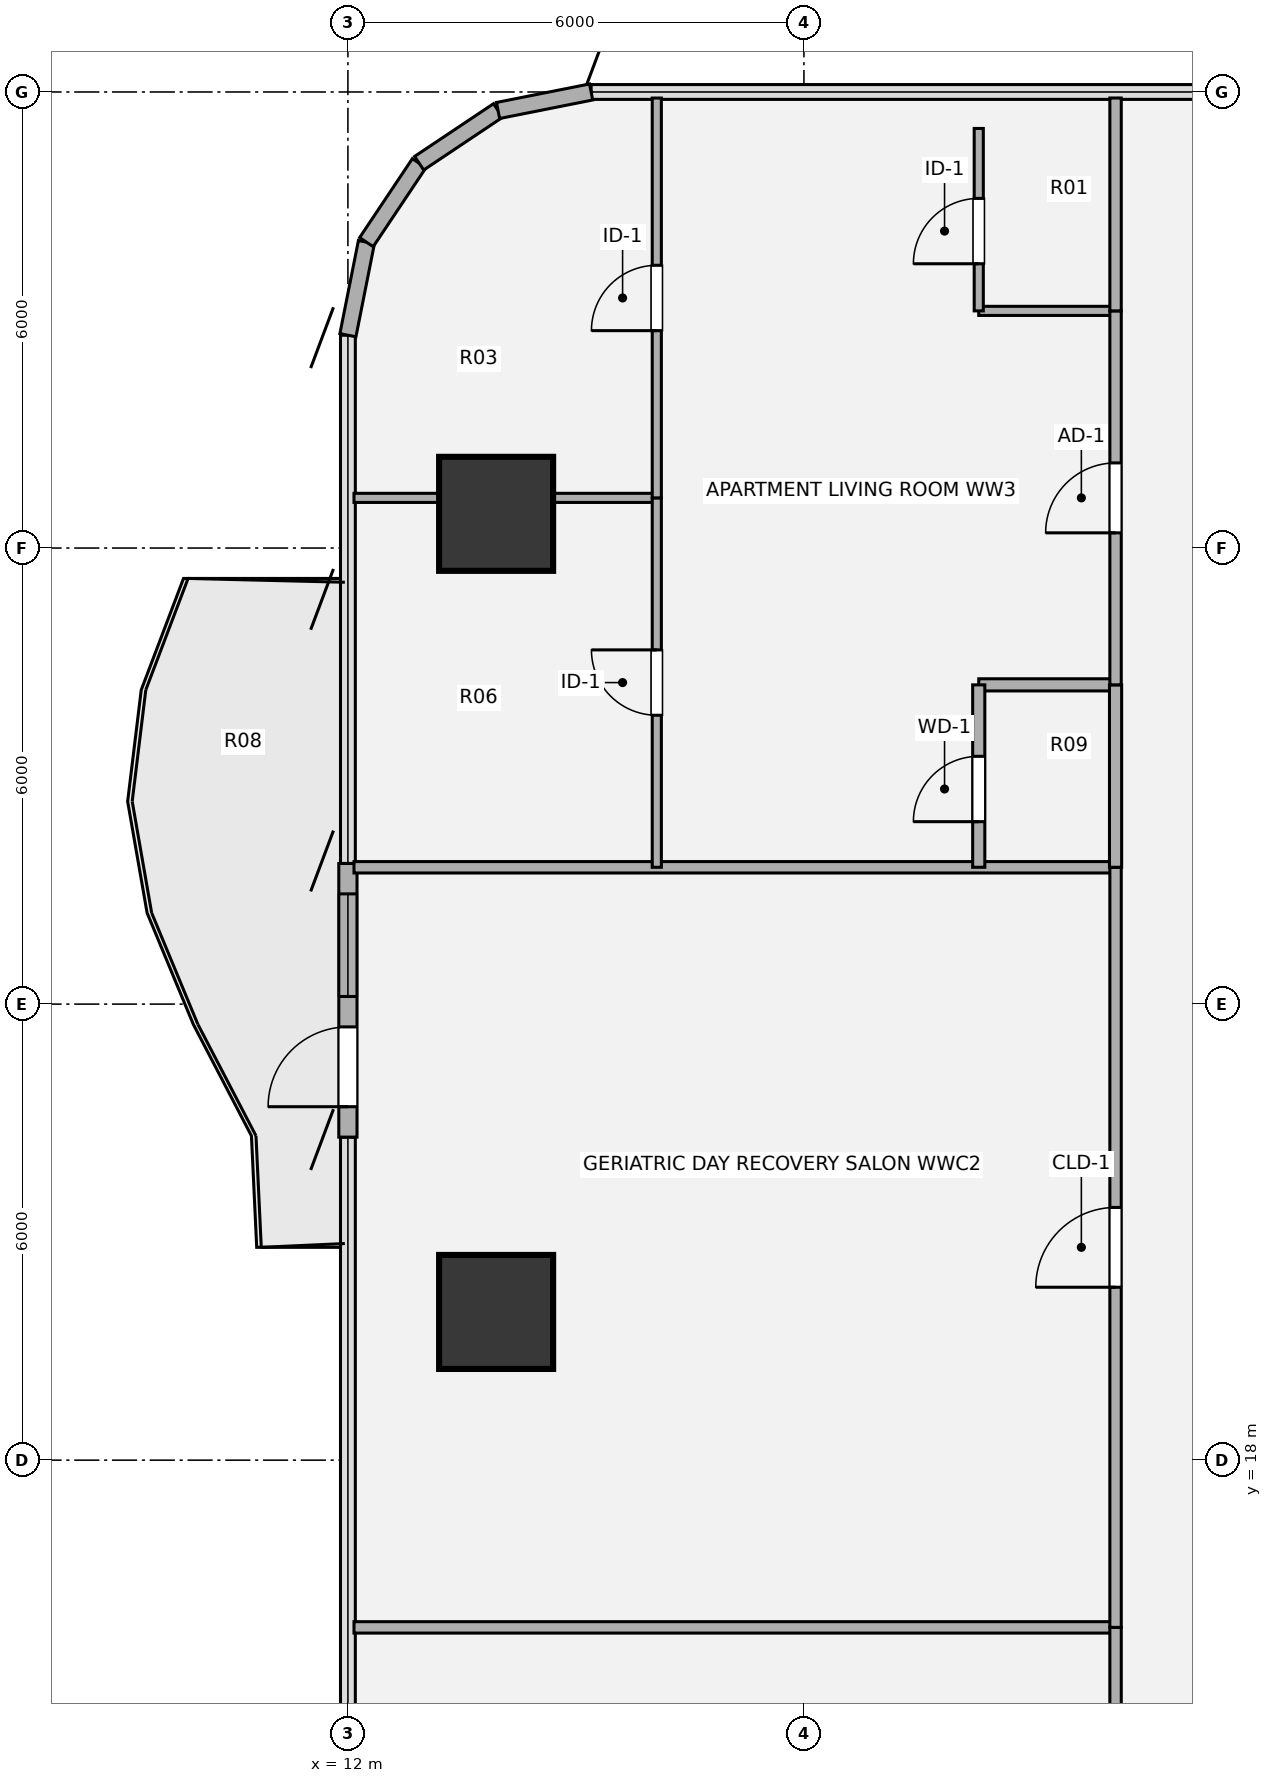
"""IFC4 building model, lengths in metres.
Left out: names, types, materials, properties, quantities, classifications, styles, units other than length and angle.
Written with IfcOpenShell. Run it as: python <this file> out.ifc"""

import sys

from ifc_helpers import new_model, si_unit, direction, frame, frame_2d, origin, origin_2d, place, context, subcontext, project, spatial, rectangle, hollow_circle, extrude, source, transform, mapped, element, fill, save


model = new_model("IFC4")
c1 = context("Model", 3, precision=1e-05, world=origin(), true_north=direction((0.0, 1.0)))
c2 = subcontext(c1, "Body", "Model", "MODEL_VIEW")
j1 = project(units=[si_unit("LENGTHUNIT", "METRE"), si_unit("PLANEANGLEUNIT", "RADIAN")], contexts=[c1])
p1 = place(None, origin())
s1 = spatial("IfcSite", under=j1, at=p1, CompositionType="ELEMENT")
p2 = place(p1, origin())
s2 = spatial("IfcBuilding", under=s1, at=p2, CompositionType="ELEMENT")
p3 = place(p2, frame((0.0, 0.0, 72.36)))
s3 = spatial("IfcBuildingStorey", under=s2, at=p3, CompositionType="ELEMENT", Elevation=72.36)
m1 = source(origin(), c2, "Body", "SweptSolid", [
    extrude(hollow_circle(Radius=0.75, WallThickness=0.05, at=origin_2d()), origin(), (0.0, 0.0, 1.0), 3.78),
])
for number, where, z_axis, x_axis in (
    (1, (13.95, 19.95, 0.0), (0.0, 0.0, 1.0), (1.0, 0.0, 0.0)),
    (2, (13.95, 30.45, 0.0), (0.0, 0.0, 1.0), (1.0, 0.0, 0.0)),
):
    element("IfcColumn", number, at=place(p3, frame(where, z_axis=z_axis, x_axis=x_axis)), inside=s3, PredefinedType="COLUMN", context=c2, shape_type="MappedRepresentation", body=[
        mapped(m1, transform((0.0, 0.0, 0.0), x_axis=(1.0, 0.0, 0.0), y_axis=(0.0, 1.0, 0.0), z_axis=(0.0, 0.0, 1.0), scale=1.0)),
    ])
p4 = place(p3, frame((12.0, 22.25, 0.0), z_axis=(0.0, 0.0, 1.0), x_axis=(0.0, 1.0, 0.0)))
e3 = element("IfcWall", 3, at=p4, inside=s3, PredefinedType="SOLIDWALL", context=c2, shape_type="SweptSolid", body=[
    extrude(rectangle(XDim=3.6, YDim=0.24, at=frame_2d((1.8, 0.0))), origin(), (0.0, 0.0, 1.0), 3.53),
])
p5 = place(p4, frame((0.4, 0.0, 0.0)))
e4 = element("IfcOpeningElement", 4, at=p5, cuts=e3, PredefinedType="OPENING", context=c2, shape_type="SweptSolid", body=[
    extrude(rectangle(XDim=1.05, YDim=2.15, at=origin_2d()), frame((0.525, 0.13, 1.075), z_axis=(0.0, -1.0, 0.0), x_axis=(1.0, 0.0, 0.0)), (0.0, 0.0, 1.0), 0.26),
])
p6 = place(p4, frame((1.85, 0.0, 0.85)))
e5 = element("IfcOpeningElement", 5, at=p6, cuts=e3, PredefinedType="OPENING", context=c2, shape_type="SweptSolid", body=[
    extrude(rectangle(XDim=1.35, YDim=1.35, at=origin_2d()), frame((0.675, 0.13, 0.675), z_axis=(0.0, -1.0, 0.0), x_axis=(1.0, 0.0, 0.0)), (0.0, 0.0, 1.0), 0.26),
])
for number, where, z_axis, x_axis in (
    (6, (12.0, 32.8, 0.0), (0.0, 0.0, 1.0), (0.195, 0.981, 0.0)),
    (7, (12.244, 34.025, 0.0), (0.0, 0.0, 1.0), (0.556, 0.831, 0.0)),
    (8, (12.937, 35.063, 0.0), (0.0, 0.0, 1.0), (0.831, 0.556, 0.0)),
    (9, (13.975, 35.756, 0.0), (0.0, 0.0, 1.0), (0.981, 0.195, 0.0)),
):
    element("IfcWall", number, at=place(p3, frame(where, z_axis=z_axis, x_axis=x_axis)), inside=s3, PredefinedType="SOLIDWALL", context=c2, shape_type="SweptSolid", body=[
        extrude(rectangle(XDim=1.249, YDim=0.215, at=frame_2d((0.624, 0.0))), origin(), (0.0, 0.0, 1.0), 3.53),
    ])
p7 = place(p3, frame((12.08, 15.8, 0.0), z_axis=(0.0, 0.0, 1.0), x_axis=(1.0, 0.0, 0.0)))
e10 = element("IfcWall", 10, at=p7, inside=s3, PredefinedType="PARTITIONING", context=c2, shape_type="SweptSolid", body=[
    extrude(rectangle(XDim=10.02, YDim=0.15, at=frame_2d((5.01, 0.0))), origin(), (0.0, 0.0, 1.0), 3.5),
])
p8 = place(p3, frame((12.08, 25.8, 0.0), z_axis=(0.0, 0.0, 1.0), x_axis=(1.0, 0.0, 0.0)))
e11 = element("IfcWall", 11, at=p8, inside=s3, PredefinedType="PARTITIONING", context=c2, shape_type="SweptSolid", body=[
    extrude(rectangle(XDim=10.02, YDim=0.15, at=frame_2d((5.01, 0.0))), origin(), (0.0, 0.0, 1.0), 2.982),
])
p9 = place(p3, frame((20.3, 28.2, 0.0), z_axis=(0.0, 0.0, 1.0), x_axis=(1.0, 0.0, 0.0)))
e12 = element("IfcWall", 12, at=p9, inside=s3, PredefinedType="PLUMBINGWALL", context=c2, shape_type="SweptSolid", body=[
    extrude(rectangle(XDim=1.8, YDim=0.16, at=frame_2d((0.9, 0.0))), origin(), (0.0, 0.0, 1.0), 2.982),
])
p10 = place(p3, frame((12.08, 30.66, 0.0), z_axis=(0.0, 0.0, 1.0), x_axis=(1.0, 0.0, 0.0)))
e13 = element("IfcWall", 13, at=p10, inside=s3, PredefinedType="PARTITIONING", context=c2, shape_type="SweptSolid", body=[
    extrude(rectangle(XDim=3.984, YDim=0.12, at=frame_2d((1.992, 0.0))), origin(), (0.0, 0.0, 1.0), 2.903),
])
p11 = place(p3, frame((20.3, 33.12, 0.0), z_axis=(0.0, 0.0, 1.0), x_axis=(1.0, 0.0, 0.0)))
e14 = element("IfcWall", 14, at=p11, inside=s3, PredefinedType="PARTITIONING", context=c2, shape_type="SweptSolid", body=[
    extrude(rectangle(XDim=1.8, YDim=0.12, at=frame_2d((0.9, 0.0))), origin(), (0.0, 0.0, 1.0), 3.055),
])
p12 = place(p3, frame((16.064, 25.8, 0.0), z_axis=(0.0, 0.0, 1.0), x_axis=(0.0, 1.0, 0.0)))
e15 = element("IfcWall", 15, at=p12, inside=s3, PredefinedType="PARTITIONING", context=c2, shape_type="SweptSolid", body=[
    extrude(rectangle(XDim=4.86, YDim=0.12, at=frame_2d((2.43, 0.0))), origin(), (0.0, 0.0, 1.0), 3.5),
])
p13 = place(p12, frame((2.0, 0.0, 0.0)))
e16 = element("IfcOpeningElement", 16, at=p13, cuts=e15, PredefinedType="OPENING", context=c2, shape_type="SweptSolid", body=[
    extrude(rectangle(XDim=0.86, YDim=2.1, at=origin_2d()), frame((0.43, 0.07, 1.05), z_axis=(0.0, -1.0, 0.0), x_axis=(1.0, 0.0, 0.0)), (0.0, 0.0, 1.0), 0.14),
])
p14 = place(p3, frame((16.064, 30.66, 0.0), z_axis=(0.0, 0.0, 1.0), x_axis=(0.0, 1.0, 0.0)))
e17 = element("IfcWall", 17, at=p14, inside=s3, PredefinedType="PARTITIONING", context=c2, shape_type="SweptSolid", body=[
    extrude(rectangle(XDim=5.26, YDim=0.12, at=frame_2d((2.63, 0.0))), origin(), (0.0, 0.0, 1.0), 3.5),
])
p15 = place(p14, frame((2.2, 0.0, 0.0)))
e18 = element("IfcOpeningElement", 18, at=p15, cuts=e17, PredefinedType="OPENING", context=c2, shape_type="SweptSolid", body=[
    extrude(rectangle(XDim=0.86, YDim=2.1, at=origin_2d()), frame((0.43, 0.07, 1.05), z_axis=(0.0, -1.0, 0.0), x_axis=(1.0, 0.0, 0.0)), (0.0, 0.0, 1.0), 0.14),
])
p16 = place(p3, frame((20.3, 25.8, 0.0), z_axis=(0.0, 0.0, 1.0), x_axis=(0.0, 1.0, 0.0)))
e19 = element("IfcWall", 19, at=p16, inside=s3, PredefinedType="PLUMBINGWALL", context=c2, shape_type="SweptSolid", body=[
    extrude(rectangle(XDim=2.4, YDim=0.16, at=frame_2d((1.2, 0.0))), origin(), (0.0, 0.0, 1.0), 3.5),
])
p17 = place(p16, frame((0.6, 0.0, 0.0)))
e20 = element("IfcOpeningElement", 20, at=p17, cuts=e19, PredefinedType="OPENING", context=c2, shape_type="SweptSolid", body=[
    extrude(rectangle(XDim=0.86, YDim=2.1, at=origin_2d()), frame((0.43, 0.09, 1.05), z_axis=(0.0, -1.0, 0.0), x_axis=(1.0, 0.0, 0.0)), (0.0, 0.0, 1.0), 0.18),
])
p18 = place(p3, frame((20.3, 33.12, 0.0), z_axis=(0.0, 0.0, 1.0), x_axis=(0.0, 1.0, 0.0)))
e21 = element("IfcWall", 21, at=p18, inside=s3, PredefinedType="PARTITIONING", context=c2, shape_type="SweptSolid", body=[
    extrude(rectangle(XDim=2.4, YDim=0.12, at=frame_2d((1.2, 0.0))), origin(), (0.0, 0.0, 1.0), 3.5),
])
p19 = place(p18, frame((0.62, 0.0, 0.0)))
e22 = element("IfcOpeningElement", 22, at=p19, cuts=e21, PredefinedType="OPENING", context=c2, shape_type="SweptSolid", body=[
    extrude(rectangle(XDim=0.86, YDim=2.1, at=origin_2d()), frame((0.43, 0.07, 1.05), z_axis=(0.0, -1.0, 0.0), x_axis=(1.0, 0.0, 0.0)), (0.0, 0.0, 1.0), 0.14),
])
p20 = place(p3, frame((22.1, 6.08, 0.0), z_axis=(0.0, 0.0, 1.0), x_axis=(0.0, 1.0, 0.0)))
e23 = element("IfcWall", 23, at=p20, inside=s3, PredefinedType="PARTITIONING", context=c2, shape_type="SweptSolid", body=[
    extrude(rectangle(XDim=9.72, YDim=0.15, at=frame_2d((4.86, 0.0))), origin(), (0.0, 0.0, 1.0), 3.5),
])
p21 = place(p20, frame((4.335, 0.0, 0.0)))
e24 = element("IfcOpeningElement", 24, at=p21, cuts=e23, PredefinedType="OPENING", context=c2, shape_type="SweptSolid", body=[
    extrude(rectangle(XDim=1.05, YDim=2.1, at=origin_2d()), frame((0.525, 0.085, 1.05), z_axis=(0.0, -1.0, 0.0), x_axis=(1.0, 0.0, 0.0)), (0.0, 0.0, 1.0), 0.17),
])
p22 = place(p3, frame((22.1, 15.8, 0.0), z_axis=(0.0, 0.0, 1.0), x_axis=(0.0, 1.0, 0.0)))
e25 = element("IfcWall", 25, at=p22, inside=s3, PredefinedType="PARTITIONING", context=c2, shape_type="SweptSolid", body=[
    extrude(rectangle(XDim=10.0, YDim=0.15, at=frame_2d((5.0, 0.0))), origin(), (0.0, 0.0, 1.0), 3.5),
])
p23 = place(p22, frame((4.475, 0.0, 0.0)))
e26 = element("IfcOpeningElement", 26, at=p23, cuts=e25, PredefinedType="OPENING", context=c2, shape_type="SweptSolid", body=[
    extrude(rectangle(XDim=1.05, YDim=2.1, at=origin_2d()), frame((0.525, 0.085, 1.05), z_axis=(0.0, -1.0, 0.0), x_axis=(1.0, 0.0, 0.0)), (0.0, 0.0, 1.0), 0.17),
])
p24 = place(p3, frame((22.1, 25.8, 0.0), z_axis=(0.0, 0.0, 1.0), x_axis=(0.0, 1.0, 0.0)))
e27 = element("IfcWall", 27, at=p24, inside=s3, PredefinedType="PLUMBINGWALL", context=c2, shape_type="SweptSolid", body=[
    extrude(rectangle(XDim=2.4, YDim=0.16, at=frame_2d((1.2, 0.0))), origin(), (0.0, 0.0, 1.0), 3.5),
])
p25 = place(p3, frame((22.1, 28.2, 0.0), z_axis=(0.0, 0.0, 1.0), x_axis=(0.0, 1.0, 0.0)))
e28 = element("IfcWall", 28, at=p25, inside=s3, PredefinedType="PARTITIONING", context=c2, shape_type="SweptSolid", body=[
    extrude(rectangle(XDim=4.92, YDim=0.15, at=frame_2d((2.46, 0.0))), origin(), (0.0, 0.0, 1.0), 3.5),
])
p26 = place(p25, frame((2.0, 0.0, 0.0)))
e29 = element("IfcOpeningElement", 29, at=p26, cuts=e28, PredefinedType="OPENING", context=c2, shape_type="SweptSolid", body=[
    extrude(rectangle(XDim=0.92, YDim=2.1, at=origin_2d()), frame((0.46, 0.085, 1.05), z_axis=(0.0, -1.0, 0.0), x_axis=(1.0, 0.0, 0.0)), (0.0, 0.0, 1.0), 0.17),
])
p27 = place(p3, frame((22.1, 33.12, 0.0), z_axis=(0.0, 0.0, 1.0), x_axis=(0.0, 1.0, 0.0)))
e30 = element("IfcWall", 30, at=p27, inside=s3, PredefinedType="PARTITIONING", context=c2, shape_type="SweptSolid", body=[
    extrude(rectangle(XDim=2.801, YDim=0.15, at=frame_2d((1.4, 0.0))), origin(), (0.0, 0.0, 1.0), 3.5),
])
m2 = source(origin(), c2, "Body", "SweptSolid", [
    extrude(rectangle(XDim=1.05, YDim=2.15, at=origin_2d()), frame((0.525, 0.025, 1.075), z_axis=(0.0, -1.0, 0.0), x_axis=(1.0, 0.0, 0.0)), (0.0, 0.0, 1.0), 0.05),
])
p28 = place(p5, origin())
e31 = element("IfcDoor", 31, at=p28, inside=s3, OperationType="SINGLE_SWING_LEFT", PredefinedType="DOOR", context=c2, shape_type="MappedRepresentation", body=[
    mapped(m2, transform((0.0, 0.0, 0.0), x_axis=(1.0, 0.0, 0.0), y_axis=(0.0, 1.0, 0.0), z_axis=(0.0, 0.0, 1.0), scale=1.0)),
])
fill(e4, e31)
m3 = source(origin(), c2, "Body", "SweptSolid", [
    extrude(rectangle(XDim=1.35, YDim=1.35, at=origin_2d()), frame((0.675, 0.03, 0.675), z_axis=(0.0, -1.0, 0.0), x_axis=(1.0, 0.0, 0.0)), (0.0, 0.0, 1.0), 0.06),
])
p29 = place(p6, origin())
e32 = element("IfcWindow", 32, at=p29, inside=s3, PartitioningType="SINGLE_PANEL", PredefinedType="WINDOW", context=c2, shape_type="MappedRepresentation", body=[
    mapped(m3, transform((0.0, 0.0, 0.0), x_axis=(1.0, 0.0, 0.0), y_axis=(0.0, 1.0, 0.0), z_axis=(0.0, 0.0, 1.0), scale=1.0)),
])
fill(e5, e32)
m4 = source(origin(), c2, "Body", "SweptSolid", [
    extrude(rectangle(XDim=0.86, YDim=2.1, at=origin_2d()), frame((0.43, 0.025, 1.05), z_axis=(0.0, -1.0, 0.0), x_axis=(1.0, 0.0, 0.0)), (0.0, 0.0, 1.0), 0.05),
])
p30 = place(p13, origin())
e33 = element("IfcDoor", 33, at=p30, inside=s3, OperationType="SINGLE_SWING_RIGHT", PredefinedType="DOOR", context=c2, shape_type="MappedRepresentation", body=[
    mapped(m4, transform((0.0, 0.0, 0.0), x_axis=(1.0, 0.0, 0.0), y_axis=(0.0, 1.0, 0.0), z_axis=(0.0, 0.0, 1.0), scale=1.0)),
])
fill(e16, e33)
p31 = place(p15, origin())
e34 = element("IfcDoor", 34, at=p31, inside=s3, OperationType="SINGLE_SWING_LEFT", PredefinedType="DOOR", context=c2, shape_type="MappedRepresentation", body=[
    mapped(m4, transform((0.0, 0.0, 0.0), x_axis=(1.0, 0.0, 0.0), y_axis=(0.0, 1.0, 0.0), z_axis=(0.0, 0.0, 1.0), scale=1.0)),
])
fill(e18, e34)
m5 = source(origin(), c2, "Body", "SweptSolid", [
    extrude(rectangle(XDim=0.86, YDim=2.1, at=origin_2d()), frame((0.43, 0.025, 1.05), z_axis=(0.0, -1.0, 0.0), x_axis=(1.0, 0.0, 0.0)), (0.0, 0.0, 1.0), 0.05),
])
p32 = place(p17, origin())
e35 = element("IfcDoor", 35, at=p32, inside=s3, OperationType="SINGLE_SWING_LEFT", PredefinedType="DOOR", context=c2, shape_type="MappedRepresentation", body=[
    mapped(m5, transform((0.0, 0.0, 0.0), x_axis=(1.0, 0.0, 0.0), y_axis=(0.0, 1.0, 0.0), z_axis=(0.0, 0.0, 1.0), scale=1.0)),
])
fill(e20, e35)
p33 = place(p19, origin())
e36 = element("IfcDoor", 36, at=p33, inside=s3, OperationType="SINGLE_SWING_LEFT", PredefinedType="DOOR", context=c2, shape_type="MappedRepresentation", body=[
    mapped(m4, transform((0.0, 0.0, 0.0), x_axis=(1.0, 0.0, 0.0), y_axis=(0.0, 1.0, 0.0), z_axis=(0.0, 0.0, 1.0), scale=1.0)),
])
fill(e22, e36)
m6 = source(origin(), c2, "Body", "SweptSolid", [
    extrude(rectangle(XDim=1.05, YDim=2.1, at=origin_2d()), frame((0.525, 0.025, 1.05), z_axis=(0.0, -1.0, 0.0), x_axis=(1.0, 0.0, 0.0)), (0.0, 0.0, 1.0), 0.05),
])
p34 = place(p23, origin())
e37 = element("IfcDoor", 37, at=p34, inside=s3, OperationType="SINGLE_SWING_LEFT", PredefinedType="DOOR", context=c2, shape_type="MappedRepresentation", body=[
    mapped(m6, transform((0.0, 0.0, 0.0), x_axis=(1.0, 0.0, 0.0), y_axis=(0.0, 1.0, 0.0), z_axis=(0.0, 0.0, 1.0), scale=1.0)),
])
fill(e26, e37)
m7 = source(origin(), c2, "Body", "SweptSolid", [
    extrude(rectangle(XDim=0.92, YDim=2.1, at=origin_2d()), frame((0.46, 0.025, 1.05), z_axis=(0.0, -1.0, 0.0), x_axis=(1.0, 0.0, 0.0)), (0.0, 0.0, 1.0), 0.05),
])
p35 = place(p26, origin())
e38 = element("IfcDoor", 38, at=p35, inside=s3, OperationType="SINGLE_SWING_LEFT", PredefinedType="DOOR", context=c2, shape_type="MappedRepresentation", body=[
    mapped(m7, transform((0.0, 0.0, 0.0), x_axis=(1.0, 0.0, 0.0), y_axis=(0.0, 1.0, 0.0), z_axis=(0.0, 0.0, 1.0), scale=1.0)),
])
fill(e29, e38)
save(model, sys.argv[1])
